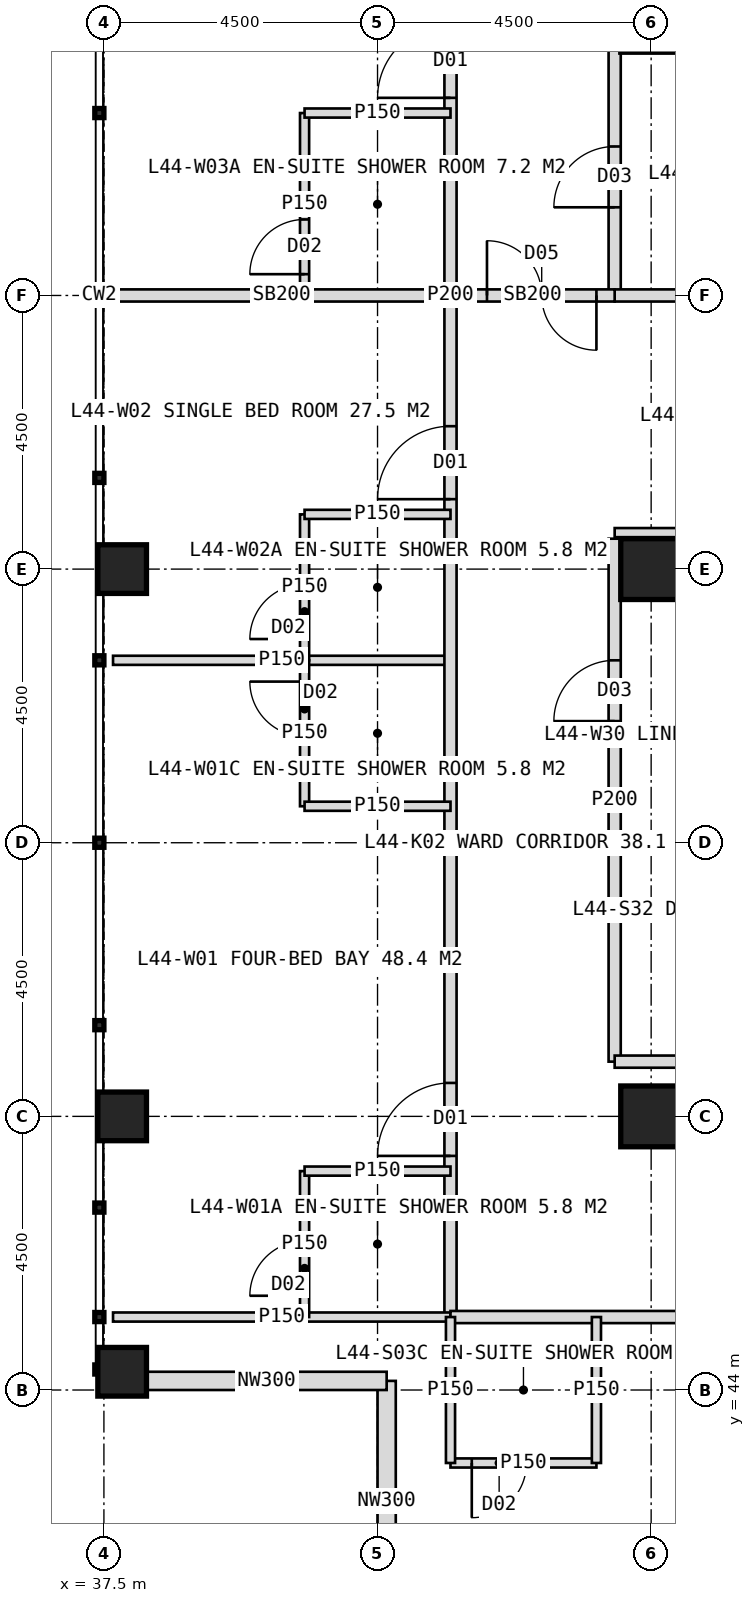
"""IFC4 building model, lengths in metres.
Left out: names, types, materials, properties, quantities, classifications, styles, units other than length and angle.
Written with IfcOpenShell. Run it as: python <this file> out.ifc"""

import sys

from ifc_helpers import new_model, si_unit, direction, frame, frame_2d, origin, origin_2d, place, context, subcontext, project, spatial, rectangle, hollow_rectangle, extrude, element, fill, save


model = new_model("IFC4")
c1 = context("Model", 3, precision=1e-05, world=origin(), true_north=direction((0.0, 1.0)))
c2 = subcontext(c1, "Body", "Model", "MODEL_VIEW")
j1 = project(units=[si_unit("LENGTHUNIT", "METRE"), si_unit("PLANEANGLEUNIT", "RADIAN")], contexts=[c1])
p1 = place(None, origin())
s1 = spatial("IfcSite", under=j1, at=p1, CompositionType="ELEMENT")
p2 = place(p1, origin())
s2 = spatial("IfcBuilding", under=s1, at=p2, CompositionType="ELEMENT")
p3 = place(p2, frame((0.0, 0.0, 185.0)))
s3 = spatial("IfcBuildingStorey", under=s2, at=p3, CompositionType="ELEMENT", Elevation=185.0)
for number, where, z_axis, x_axis in (
    (1, (46.5, 48.5, 0.0), (0.0, 0.0, 1.0), (1.0, 0.0, 0.0)),
    (2, (46.5, 57.5, 0.0), (0.0, 0.0, 1.0), (1.0, 0.0, 0.0)),
):
    element("IfcColumn", number, at=place(p3, frame(where, z_axis=z_axis, x_axis=x_axis)), inside=s3, PredefinedType="COLUMN", context=c2, shape_type="SweptSolid", body=[
        extrude(hollow_rectangle(XDim=1.0, YDim=1.0, WallThickness=0.1, at=origin_2d()), origin(), (0.0, 0.0, 1.0), 4.0),
    ])
for number, where, z_axis, x_axis in (
    (3, (37.8, 44.3, 0.0), (0.0, 0.0, 1.0), (1.0, 0.0, 0.0)),
    (4, (37.8, 48.5, 0.0), (0.0, 0.0, 1.0), (1.0, 0.0, 0.0)),
    (5, (37.8, 57.5, 0.0), (0.0, 0.0, 1.0), (1.0, 0.0, 0.0)),
):
    element("IfcColumn", number, at=place(p3, frame(where, z_axis=z_axis, x_axis=x_axis)), inside=s3, PredefinedType="COLUMN", context=c2, shape_type="SweptSolid", body=[
        extrude(hollow_rectangle(XDim=0.8, YDim=0.8, WallThickness=0.08, at=origin_2d()), origin(), (0.0, 0.0, 1.0), 4.0),
    ])
for number, where, z_axis, x_axis in (
    (6, (42.15, 40.2, 0.0), (0.0, 0.0, 1.0), (0.0, 1.0, 0.0)),
    (7, (42.15, 44.15, 0.0), (0.0, 0.0, 1.0), (-1.0, 0.0, 0.0)),
):
    element("IfcWall", number, at=place(p3, frame(where, z_axis=z_axis, x_axis=x_axis)), inside=s3, PredefinedType="ELEMENTEDWALL", context=c2, shape_type="SweptSolid", body=[
        extrude(rectangle(XDim=3.95, YDim=0.3, at=frame_2d((1.975, 0.0))), origin(), (0.0, 0.0, 1.0), 2.85),
    ])
p4 = place(p3, frame((43.2, 56.0, 0.0), z_axis=(0.0, 0.0, 1.0), x_axis=(-1.0, 0.0, 0.0)))
e8 = element("IfcWall", 8, at=p4, inside=s3, PredefinedType="PARTITIONING", context=c2, shape_type="SweptSolid", body=[
    extrude(rectangle(XDim=5.55, YDim=0.15, at=frame_2d((2.775, 0.0))), origin(), (0.0, 0.0, 1.0), 3.75),
])
p5 = place(p3, frame((43.2, 62.0, 0.0), z_axis=(0.0, 0.0, 1.0), x_axis=(-1.0, 0.0, 0.0)))
e9 = element("IfcWall", 9, at=p5, inside=s3, PredefinedType="SOLIDWALL", context=c2, shape_type="SweptSolid", body=[
    extrude(rectangle(XDim=5.55, YDim=0.2, at=frame_2d((2.775, 0.0))), origin(), (0.0, 0.0, 1.0), 2.95),
])
p6 = place(p3, frame((43.2, 45.2, 0.0), z_axis=(0.0, 0.0, 1.0), x_axis=(0.0, 1.0, 0.0)))
e10 = element("IfcWall", 10, at=p6, inside=s3, PredefinedType="PARTITIONING", context=c2, shape_type="SweptSolid", body=[
    extrude(rectangle(XDim=33.6, YDim=0.2, at=frame_2d((16.8, 0.0))), origin(), (0.0, 0.0, 1.0), 3.75),
])
p7 = place(p6, frame((2.65, 0.0, 0.0)))
e11 = element("IfcOpeningElement", 11, at=p7, cuts=e10, PredefinedType="OPENING", context=c2, shape_type="SweptSolid", body=[
    extrude(rectangle(XDim=1.2, YDim=2.2, at=frame_2d((0.6, 1.1))), frame((0.0, 0.11, 0.0), z_axis=(0.0, -1.0, 0.0), x_axis=(1.0, 0.0, 0.0)), (0.0, 0.0, 1.0), 0.22),
])
p8 = place(p6, frame((13.45, 0.0, 0.0)))
e12 = element("IfcOpeningElement", 12, at=p8, cuts=e10, PredefinedType="OPENING", context=c2, shape_type="SweptSolid", body=[
    extrude(rectangle(XDim=1.2, YDim=2.2, at=frame_2d((0.6, 1.1))), frame((0.0, 0.11, 0.0), z_axis=(0.0, -1.0, 0.0), x_axis=(1.0, 0.0, 0.0)), (0.0, 0.0, 1.0), 0.22),
])
p9 = place(p6, frame((20.05, 0.0, 0.0)))
e13 = element("IfcOpeningElement", 13, at=p9, cuts=e10, PredefinedType="OPENING", context=c2, shape_type="SweptSolid", body=[
    extrude(rectangle(XDim=1.2, YDim=2.2, at=frame_2d((0.6, 1.1))), frame((0.0, 0.11, 0.0), z_axis=(0.0, -1.0, 0.0), x_axis=(1.0, 0.0, 0.0)), (0.0, 0.0, 1.0), 0.22),
])
p10 = place(p6, frame((29.05, 0.0, 0.0)))
e14 = element("IfcOpeningElement", 14, at=p10, cuts=e10, PredefinedType="OPENING", context=c2, shape_type="SweptSolid", body=[
    extrude(rectangle(XDim=1.2, YDim=2.2, at=frame_2d((0.6, 1.1))), frame((0.0, 0.11, 0.0), z_axis=(0.0, -1.0, 0.0), x_axis=(1.0, 0.0, 0.0)), (0.0, 0.0, 1.0), 0.22),
])
p11 = place(p3, frame((43.2, 45.2, 0.0), z_axis=(0.0, 0.0, 1.0), x_axis=(-1.0, 0.0, 0.0)))
e15 = element("IfcWall", 15, at=p11, inside=s3, PredefinedType="PARTITIONING", context=c2, shape_type="SweptSolid", body=[
    extrude(rectangle(XDim=5.55, YDim=0.15, at=frame_2d((2.775, 0.0))), origin(), (0.0, 0.0, 1.0), 3.75),
])
p12 = place(p3, frame((40.8, 45.2, 0.0), z_axis=(0.0, 0.0, 1.0), x_axis=(0.0, 1.0, 0.0)))
e16 = element("IfcWall", 16, at=p12, inside=s3, PredefinedType="PARTITIONING", context=c2, shape_type="SweptSolid", body=[
    extrude(rectangle(XDim=2.4, YDim=0.15, at=frame_2d((1.2, 0.0))), origin(), (0.0, 0.0, 1.0), 3.75),
])
p13 = place(p12, frame((0.35, 0.0, 0.0)))
e17 = element("IfcOpeningElement", 17, at=p13, cuts=e16, PredefinedType="OPENING", context=c2, shape_type="SweptSolid", body=[
    extrude(rectangle(XDim=0.9, YDim=2.1, at=frame_2d((0.45, 1.05))), frame((0.0, 0.085, 0.0), z_axis=(0.0, -1.0, 0.0), x_axis=(1.0, 0.0, 0.0)), (0.0, 0.0, 1.0), 0.17),
])
p14 = place(p3, frame((43.2, 47.6, 0.0), z_axis=(0.0, 0.0, 1.0), x_axis=(-1.0, 0.0, 0.0)))
e18 = element("IfcWall", 18, at=p14, inside=s3, PredefinedType="PARTITIONING", context=c2, shape_type="SweptSolid", body=[
    extrude(rectangle(XDim=2.4, YDim=0.15, at=frame_2d((1.2, 0.0))), origin(), (0.0, 0.0, 1.0), 3.75),
])
p15 = place(p3, frame((40.8, 53.6, 0.0), z_axis=(0.0, 0.0, 1.0), x_axis=(0.0, 1.0, 0.0)))
e19 = element("IfcWall", 19, at=p15, inside=s3, PredefinedType="PARTITIONING", context=c2, shape_type="SweptSolid", body=[
    extrude(rectangle(XDim=2.4, YDim=0.15, at=frame_2d((1.2, 0.0))), origin(), (0.0, 0.0, 1.0), 3.75),
])
p16 = place(p15, frame((1.15, 0.0, 0.0)))
e20 = element("IfcOpeningElement", 20, at=p16, cuts=e19, PredefinedType="OPENING", context=c2, shape_type="SweptSolid", body=[
    extrude(rectangle(XDim=0.9, YDim=2.1, at=frame_2d((0.45, 1.05))), frame((0.0, 0.085, 0.0), z_axis=(0.0, -1.0, 0.0), x_axis=(1.0, 0.0, 0.0)), (0.0, 0.0, 1.0), 0.17),
])
p17 = place(p3, frame((43.2, 53.6, 0.0), z_axis=(0.0, 0.0, 1.0), x_axis=(-1.0, 0.0, 0.0)))
e21 = element("IfcWall", 21, at=p17, inside=s3, PredefinedType="PARTITIONING", context=c2, shape_type="SweptSolid", body=[
    extrude(rectangle(XDim=2.4, YDim=0.15, at=frame_2d((1.2, 0.0))), origin(), (0.0, 0.0, 1.0), 3.75),
])
p18 = place(p3, frame((40.8, 56.0, 0.0), z_axis=(0.0, 0.0, 1.0), x_axis=(0.0, 1.0, 0.0)))
e22 = element("IfcWall", 22, at=p18, inside=s3, PredefinedType="PARTITIONING", context=c2, shape_type="SweptSolid", body=[
    extrude(rectangle(XDim=2.4, YDim=0.15, at=frame_2d((1.2, 0.0))), origin(), (0.0, 0.0, 1.0), 3.75),
])
p19 = place(p18, frame((0.35, 0.0, 0.0)))
e23 = element("IfcOpeningElement", 23, at=p19, cuts=e22, PredefinedType="OPENING", context=c2, shape_type="SweptSolid", body=[
    extrude(rectangle(XDim=0.9, YDim=2.1, at=frame_2d((0.45, 1.05))), frame((0.0, 0.085, 0.0), z_axis=(0.0, -1.0, 0.0), x_axis=(1.0, 0.0, 0.0)), (0.0, 0.0, 1.0), 0.17),
])
p20 = place(p3, frame((43.2, 58.4, 0.0), z_axis=(0.0, 0.0, 1.0), x_axis=(-1.0, 0.0, 0.0)))
e24 = element("IfcWall", 24, at=p20, inside=s3, PredefinedType="PARTITIONING", context=c2, shape_type="SweptSolid", body=[
    extrude(rectangle(XDim=2.4, YDim=0.15, at=frame_2d((1.2, 0.0))), origin(), (0.0, 0.0, 1.0), 3.75),
])
p21 = place(p3, frame((40.8, 62.0, 0.0), z_axis=(0.0, 0.0, 1.0), x_axis=(0.0, 1.0, 0.0)))
e25 = element("IfcWall", 25, at=p21, inside=s3, PredefinedType="PARTITIONING", context=c2, shape_type="SweptSolid", body=[
    extrude(rectangle(XDim=3.0, YDim=0.15, at=frame_2d((1.5, 0.0))), origin(), (0.0, 0.0, 1.0), 3.75),
])
p22 = place(p21, frame((0.35, 0.0, 0.0)))
e26 = element("IfcOpeningElement", 26, at=p22, cuts=e25, PredefinedType="OPENING", context=c2, shape_type="SweptSolid", body=[
    extrude(rectangle(XDim=0.9, YDim=2.1, at=frame_2d((0.45, 1.05))), frame((0.0, 0.085, 0.0), z_axis=(0.0, -1.0, 0.0), x_axis=(1.0, 0.0, 0.0)), (0.0, 0.0, 1.0), 0.17),
])
p23 = place(p3, frame((43.2, 65.0, 0.0), z_axis=(0.0, 0.0, 1.0), x_axis=(-1.0, 0.0, 0.0)))
e27 = element("IfcWall", 27, at=p23, inside=s3, PredefinedType="PARTITIONING", context=c2, shape_type="SweptSolid", body=[
    extrude(rectangle(XDim=2.4, YDim=0.15, at=frame_2d((1.2, 0.0))), origin(), (0.0, 0.0, 1.0), 3.75),
])
p24 = place(p3, frame((51.0, 53.0, 0.0), z_axis=(0.0, 0.0, 1.0), x_axis=(-1.0, 0.0, 0.0)))
e28 = element("IfcWall", 28, at=p24, inside=s3, PredefinedType="PARTITIONING", context=c2, shape_type="SweptSolid", body=[
    extrude(rectangle(XDim=5.1, YDim=0.15, at=frame_2d((2.55, 0.0))), origin(), (0.0, 0.0, 1.0), 3.75),
])
p25 = place(p3, frame((45.9, 49.4, 0.0), z_axis=(0.0, 0.0, 1.0), x_axis=(0.0, 1.0, 0.0)))
e29 = element("IfcWall", 29, at=p25, inside=s3, PredefinedType="PARTITIONING", context=c2, shape_type="SweptSolid", body=[
    extrude(rectangle(XDim=8.6, YDim=0.2, at=frame_2d((4.3, 0.0))), origin(), (0.0, 0.0, 1.0), 3.75),
])
p26 = place(p25, frame((5.6, 0.0, 0.0)))
e30 = element("IfcOpeningElement", 30, at=p26, cuts=e29, PredefinedType="OPENING", context=c2, shape_type="SweptSolid", body=[
    extrude(rectangle(XDim=1.0, YDim=2.1, at=frame_2d((0.5, 1.05))), frame((0.0, 0.11, 0.0), z_axis=(0.0, -1.0, 0.0), x_axis=(1.0, 0.0, 0.0)), (0.0, 0.0, 1.0), 0.22),
])
p27 = place(p3, frame((45.9, 62.0, 0.0), z_axis=(0.0, 0.0, 1.0), x_axis=(0.0, 1.0, 0.0)))
e31 = element("IfcWall", 31, at=p27, inside=s3, PredefinedType="PARTITIONING", context=c2, shape_type="SweptSolid", body=[
    extrude(rectangle(XDim=14.1, YDim=0.2, at=frame_2d((7.05, 0.0))), origin(), (0.0, 0.0, 1.0), 3.75),
])
p28 = place(p27, frame((1.45, 0.0, 0.0)))
e32 = element("IfcOpeningElement", 32, at=p28, cuts=e31, PredefinedType="OPENING", context=c2, shape_type="SweptSolid", body=[
    extrude(rectangle(XDim=1.0, YDim=2.1, at=frame_2d((0.5, 1.05))), frame((0.0, 0.11, 0.0), z_axis=(0.0, -1.0, 0.0), x_axis=(1.0, 0.0, 0.0)), (0.0, 0.0, 1.0), 0.22),
])
p29 = place(p27, frame((10.3, 0.0, 0.0)))
e33 = element("IfcOpeningElement", 33, at=p29, cuts=e31, PredefinedType="OPENING", context=c2, shape_type="SweptSolid", body=[
    extrude(rectangle(XDim=1.0, YDim=2.1, at=frame_2d((0.5, 1.05))), frame((0.0, 0.11, 0.0), z_axis=(0.0, -1.0, 0.0), x_axis=(1.0, 0.0, 0.0)), (0.0, 0.0, 1.0), 0.22),
])
p30 = place(p3, frame((51.0, 58.1, 0.0), z_axis=(0.0, 0.0, 1.0), x_axis=(-1.0, 0.0, 0.0)))
e34 = element("IfcWall", 34, at=p30, inside=s3, PredefinedType="PARTITIONING", context=c2, shape_type="SweptSolid", body=[
    extrude(rectangle(XDim=5.1, YDim=0.15, at=frame_2d((2.55, 0.0))), origin(), (0.0, 0.0, 1.0), 3.75),
])
p31 = place(p30, frame((0.6, 0.0, 0.0)))
e35 = element("IfcOpeningElement", 35, at=p31, cuts=e34, PredefinedType="OPENING", context=c2, shape_type="SweptSolid", body=[
    extrude(rectangle(XDim=0.9, YDim=2.1, at=frame_2d((0.45, 1.05))), frame((0.0, 0.085, 0.0), z_axis=(0.0, -1.0, 0.0), x_axis=(1.0, 0.0, 0.0)), (0.0, 0.0, 1.0), 0.17),
])
p32 = place(p3, frame((51.0, 62.0, 0.0), z_axis=(0.0, 0.0, 1.0), x_axis=(-1.0, 0.0, 0.0)))
e36 = element("IfcWall", 36, at=p32, inside=s3, PredefinedType="SOLIDWALL", context=c2, shape_type="SweptSolid", body=[
    extrude(rectangle(XDim=5.1, YDim=0.2, at=frame_2d((2.55, 0.0))), origin(), (0.0, 0.0, 1.0), 2.95),
])
p33 = place(p3, frame((76.8, 45.2, 0.0), z_axis=(0.0, 0.0, 1.0), x_axis=(-1.0, 0.0, 0.0)))
e37 = element("IfcWall", 37, at=p33, inside=s3, PredefinedType="PARTITIONING", context=c2, shape_type="SweptSolid", body=[
    extrude(rectangle(XDim=33.6, YDim=0.2, at=frame_2d((16.8, 0.0))), origin(), (0.0, 0.0, 1.0), 3.75),
])
p34 = place(p33, frame((2.65, 0.0, 0.0)))
e38 = element("IfcOpeningElement", 38, at=p34, cuts=e37, PredefinedType="OPENING", context=c2, shape_type="SweptSolid", body=[
    extrude(rectangle(XDim=1.2, YDim=2.2, at=frame_2d((0.6, 1.1))), frame((0.0, 0.11, 0.0), z_axis=(0.0, -1.0, 0.0), x_axis=(1.0, 0.0, 0.0)), (0.0, 0.0, 1.0), 0.22),
])
p35 = place(p33, frame((14.05, 0.0, 0.0)))
e39 = element("IfcOpeningElement", 39, at=p35, cuts=e37, PredefinedType="OPENING", context=c2, shape_type="SweptSolid", body=[
    extrude(rectangle(XDim=1.2, YDim=2.2, at=frame_2d((0.6, 1.1))), frame((0.0, 0.11, 0.0), z_axis=(0.0, -1.0, 0.0), x_axis=(1.0, 0.0, 0.0)), (0.0, 0.0, 1.0), 0.22),
])
p36 = place(p33, frame((22.45, 0.0, 0.0)))
e40 = element("IfcOpeningElement", 40, at=p36, cuts=e37, PredefinedType="OPENING", context=c2, shape_type="SweptSolid", body=[
    extrude(rectangle(XDim=1.2, YDim=2.2, at=frame_2d((0.6, 1.1))), frame((0.0, 0.11, 0.0), z_axis=(0.0, -1.0, 0.0), x_axis=(1.0, 0.0, 0.0)), (0.0, 0.0, 1.0), 0.22),
])
p37 = place(p3, frame((45.6, 42.8, 0.0), z_axis=(0.0, 0.0, 1.0), x_axis=(-1.0, 0.0, 0.0)))
e41 = element("IfcWall", 41, at=p37, inside=s3, PredefinedType="PARTITIONING", context=c2, shape_type="SweptSolid", body=[
    extrude(rectangle(XDim=2.4, YDim=0.15, at=frame_2d((1.2, 0.0))), origin(), (0.0, 0.0, 1.0), 3.75),
])
p38 = place(p37, frame((1.15, 0.0, 0.0)))
e42 = element("IfcOpeningElement", 42, at=p38, cuts=e41, PredefinedType="OPENING", context=c2, shape_type="SweptSolid", body=[
    extrude(rectangle(XDim=0.9, YDim=2.1, at=frame_2d((0.45, 1.05))), frame((0.0, 0.085, 0.0), z_axis=(0.0, -1.0, 0.0), x_axis=(1.0, 0.0, 0.0)), (0.0, 0.0, 1.0), 0.17),
])
for number, where, z_axis, x_axis in (
    (43, (45.6, 45.2, 0.0), (0.0, 0.0, 1.0), (0.0, -1.0, 0.0)),
    (44, (43.2, 45.2, 0.0), (0.0, 0.0, 1.0), (0.0, -1.0, 0.0)),
):
    element("IfcWall", number, at=place(p3, frame(where, z_axis=z_axis, x_axis=x_axis)), inside=s3, PredefinedType="PARTITIONING", context=c2, shape_type="SweptSolid", body=[
        extrude(rectangle(XDim=2.4, YDim=0.15, at=frame_2d((1.2, 0.0))), origin(), (0.0, 0.0, 1.0), 3.75),
    ])
p39 = place(p3, frame((57.75, 49.4, 0.0), z_axis=(0.0, 0.0, 1.0), x_axis=(-1.0, 0.0, 0.0)))
e45 = element("IfcWall", 45, at=p39, inside=s3, PredefinedType="PARTITIONING", context=c2, shape_type="SweptSolid", body=[
    extrude(rectangle(XDim=11.85, YDim=0.2, at=frame_2d((5.925, 0.0))), origin(), (0.0, 0.0, 1.0), 3.75),
])
p40 = place(p39, frame((4.3, 0.0, 0.0)))
e46 = element("IfcOpeningElement", 46, at=p40, cuts=e45, PredefinedType="OPENING", context=c2, shape_type="SweptSolid", body=[
    extrude(rectangle(XDim=1.0, YDim=2.1, at=frame_2d((0.5, 1.05))), frame((0.0, 0.11, 0.0), z_axis=(0.0, -1.0, 0.0), x_axis=(1.0, 0.0, 0.0)), (0.0, 0.0, 1.0), 0.22),
])
p41 = place(p39, frame((8.8, 0.0, 0.0)))
e47 = element("IfcOpeningElement", 47, at=p41, cuts=e45, PredefinedType="OPENING", context=c2, shape_type="SweptSolid", body=[
    extrude(rectangle(XDim=1.0, YDim=2.1, at=frame_2d((0.5, 1.05))), frame((0.0, 0.11, 0.0), z_axis=(0.0, -1.0, 0.0), x_axis=(1.0, 0.0, 0.0)), (0.0, 0.0, 1.0), 0.22),
])
p42 = place(p3, frame((45.9, 62.0, 0.0), z_axis=(0.0, 0.0, 1.0), x_axis=(-1.0, 0.0, 0.0)))
e48 = element("IfcWall", 48, at=p42, inside=s3, PredefinedType="SOLIDWALL", context=c2, shape_type="SweptSolid", body=[
    extrude(rectangle(XDim=2.7, YDim=0.2, at=frame_2d((1.35, 0.0))), origin(), (0.0, 0.0, 1.0), 2.95),
])
p43 = place(p42, frame((0.3, 0.0, 0.0)))
e49 = element("IfcOpeningElement", 49, at=p43, cuts=e48, PredefinedType="OPENING", context=c2, shape_type="SweptSolid", body=[
    extrude(rectangle(XDim=1.8, YDim=2.2, at=frame_2d((0.9, 1.1))), frame((0.0, 0.11, 0.0), z_axis=(0.0, -1.0, 0.0), x_axis=(1.0, 0.0, 0.0)), (0.0, 0.0, 1.0), 0.22),
])
p44 = place(p7, origin())
e50 = element("IfcDoor", 50, at=p44, inside=s3, OperationType="SINGLE_SWING_LEFT", PredefinedType="DOOR", context=c2, shape_type="SweptSolid", body=[
    extrude(rectangle(XDim=1.2, YDim=2.2, at=frame_2d((0.6, 1.1))), frame((0.0, 0.025, 0.0), z_axis=(0.0, -1.0, 0.0), x_axis=(1.0, 0.0, 0.0)), (0.0, 0.0, 1.0), 0.05),
])
fill(e11, e50)
p45 = place(p13, origin())
e51 = element("IfcDoor", 51, at=p45, inside=s3, OperationType="SINGLE_SWING_LEFT", PredefinedType="DOOR", context=c2, shape_type="SweptSolid", body=[
    extrude(rectangle(XDim=0.9, YDim=2.1, at=frame_2d((0.45, 1.05))), frame((0.0, 0.025, 0.0), z_axis=(0.0, -1.0, 0.0), x_axis=(1.0, 0.0, 0.0)), (0.0, 0.0, 1.0), 0.05),
])
fill(e17, e51)
p46 = place(p16, origin())
e52 = element("IfcDoor", 52, at=p46, inside=s3, OperationType="SINGLE_SWING_RIGHT", PredefinedType="DOOR", context=c2, shape_type="SweptSolid", body=[
    extrude(rectangle(XDim=0.9, YDim=2.1, at=frame_2d((0.45, 1.05))), frame((0.0, 0.025, 0.0), z_axis=(0.0, -1.0, 0.0), x_axis=(1.0, 0.0, 0.0)), (0.0, 0.0, 1.0), 0.05),
])
fill(e20, e52)
p47 = place(p8, origin())
e53 = element("IfcDoor", 53, at=p47, inside=s3, OperationType="SINGLE_SWING_LEFT", PredefinedType="DOOR", context=c2, shape_type="SweptSolid", body=[
    extrude(rectangle(XDim=1.2, YDim=2.2, at=frame_2d((0.6, 1.1))), frame((0.0, 0.025, 0.0), z_axis=(0.0, -1.0, 0.0), x_axis=(1.0, 0.0, 0.0)), (0.0, 0.0, 1.0), 0.05),
])
fill(e12, e53)
p48 = place(p19, origin())
e54 = element("IfcDoor", 54, at=p48, inside=s3, OperationType="SINGLE_SWING_LEFT", PredefinedType="DOOR", context=c2, shape_type="SweptSolid", body=[
    extrude(rectangle(XDim=0.9, YDim=2.1, at=frame_2d((0.45, 1.05))), frame((0.0, 0.025, 0.0), z_axis=(0.0, -1.0, 0.0), x_axis=(1.0, 0.0, 0.0)), (0.0, 0.0, 1.0), 0.05),
])
fill(e23, e54)
p49 = place(p9, origin())
e55 = element("IfcDoor", 55, at=p49, inside=s3, OperationType="SINGLE_SWING_LEFT", PredefinedType="DOOR", context=c2, shape_type="SweptSolid", body=[
    extrude(rectangle(XDim=1.2, YDim=2.2, at=frame_2d((0.6, 1.1))), frame((0.0, 0.025, 0.0), z_axis=(0.0, -1.0, 0.0), x_axis=(1.0, 0.0, 0.0)), (0.0, 0.0, 1.0), 0.05),
])
fill(e13, e55)
p50 = place(p22, origin())
e56 = element("IfcDoor", 56, at=p50, inside=s3, OperationType="SINGLE_SWING_LEFT", PredefinedType="DOOR", context=c2, shape_type="SweptSolid", body=[
    extrude(rectangle(XDim=0.9, YDim=2.1, at=frame_2d((0.45, 1.05))), frame((0.0, 0.025, 0.0), z_axis=(0.0, -1.0, 0.0), x_axis=(1.0, 0.0, 0.0)), (0.0, 0.0, 1.0), 0.05),
])
fill(e26, e56)
p51 = place(p26, origin())
e57 = element("IfcDoor", 57, at=p51, inside=s3, OperationType="SINGLE_SWING_LEFT", PredefinedType="DOOR", context=c2, shape_type="SweptSolid", body=[
    extrude(rectangle(XDim=1.0, YDim=2.1, at=frame_2d((0.5, 1.05))), frame((0.0, 0.025, 0.0), z_axis=(0.0, -1.0, 0.0), x_axis=(1.0, 0.0, 0.0)), (0.0, 0.0, 1.0), 0.05),
])
fill(e30, e57)
p52 = place(p28, origin())
e58 = element("IfcDoor", 58, at=p52, inside=s3, OperationType="SINGLE_SWING_LEFT", PredefinedType="DOOR", context=c2, shape_type="SweptSolid", body=[
    extrude(rectangle(XDim=1.0, YDim=2.1, at=frame_2d((0.5, 1.05))), frame((0.0, 0.025, 0.0), z_axis=(0.0, -1.0, 0.0), x_axis=(1.0, 0.0, 0.0)), (0.0, 0.0, 1.0), 0.05),
])
fill(e32, e58)
p53 = place(p38, origin())
e59 = element("IfcDoor", 59, at=p53, inside=s3, OperationType="SINGLE_SWING_RIGHT", PredefinedType="DOOR", context=c2, shape_type="SweptSolid", body=[
    extrude(rectangle(XDim=0.9, YDim=2.1, at=frame_2d((0.45, 1.05))), frame((0.0, 0.025, 0.0), z_axis=(0.0, -1.0, 0.0), x_axis=(1.0, 0.0, 0.0)), (0.0, 0.0, 1.0), 0.05),
])
fill(e42, e59)
p54 = place(p43, origin())
e60 = element("IfcDoor", 60, at=p54, inside=s3, OperationType="DOUBLE_DOOR_DOUBLE_SWING", PredefinedType="DOOR", context=c2, shape_type="SweptSolid", body=[
    extrude(rectangle(XDim=1.8, YDim=2.2, at=frame_2d((0.9, 1.1))), frame((0.0, 0.025, 0.0), z_axis=(0.0, -1.0, 0.0), x_axis=(1.0, 0.0, 0.0)), (0.0, 0.0, 1.0), 0.05),
])
fill(e49, e60)
save(model, sys.argv[1])
